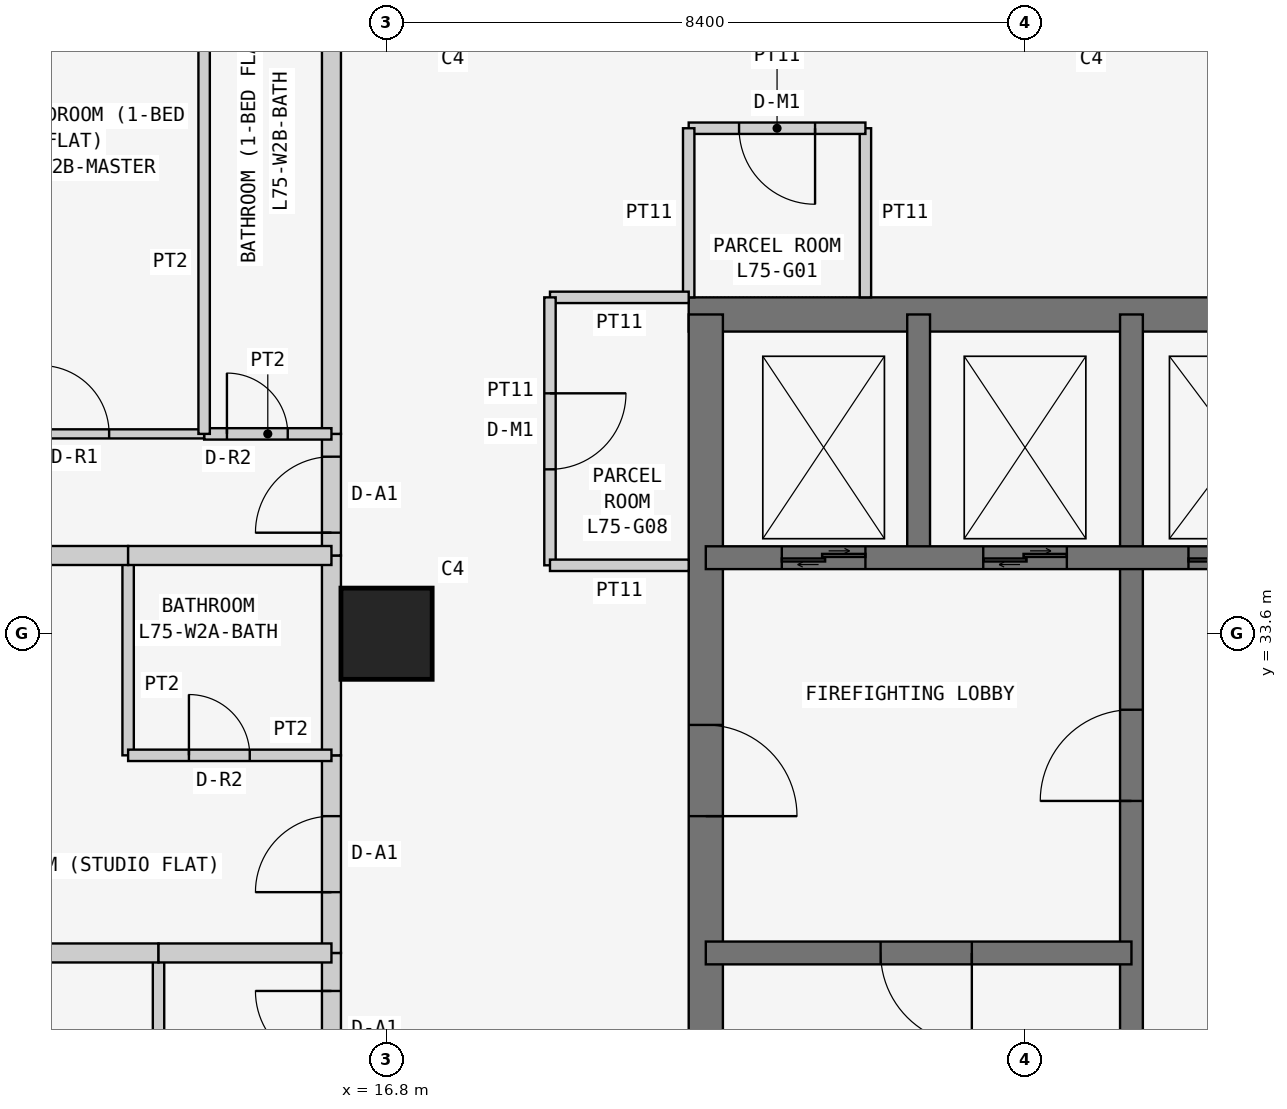
"""IFC4 building model, lengths in metres.
Left out: names, types, materials, properties, quantities, classifications, styles, units other than length and angle.
Written with IfcOpenShell. Run it as: python <this file> out.ifc"""

import sys

from ifc_helpers import new_model, si_unit, direction, frame, frame_2d, origin, origin_2d, place, context, subcontext, project, spatial, rectangle, extrude, element, fill, save


model = new_model("IFC4")
c1 = context("Model", 3, precision=1e-05, world=origin(), true_north=direction((0.0, 1.0)))
c2 = subcontext(c1, "Body", "Model", "MODEL_VIEW")
j1 = project(units=[si_unit("LENGTHUNIT", "METRE"), si_unit("PLANEANGLEUNIT", "RADIAN")], contexts=[c1])
p1 = place(None, origin())
s1 = spatial("IfcSite", under=j1, at=p1, CompositionType="ELEMENT")
p2 = place(p1, origin())
s2 = spatial("IfcBuilding", under=s1, at=p2, CompositionType="ELEMENT")
p3 = place(p2, frame((0.0, 0.0, 286.5)))
s3 = spatial("IfcBuildingStorey", under=s2, at=p3, CompositionType="ELEMENT", Elevation=286.5)
p4 = place(p3, frame((16.8, 33.6, 0.0), z_axis=(0.0, 0.0, 1.0), x_axis=(1.0, 0.0, 0.0)))
e1 = element("IfcColumn", 1, at=p4, inside=s3, PredefinedType="COLUMN", context=c2, shape_type="SweptSolid", body=[
    extrude(rectangle(XDim=1.2, YDim=1.2, at=origin_2d()), origin(), (0.0, 0.0, 1.0), 3.6),
])
p5 = place(p3, frame((37.8, 37.8, 0.0), z_axis=(0.0, 0.0, 1.0), x_axis=(-1.0, 0.0, 0.0)))
e2 = element("IfcWall", 2, at=p5, inside=s3, PredefinedType="SHEAR", context=c2, shape_type="SweptSolid", body=[
    extrude(rectangle(XDim=17.025, YDim=0.45, at=frame_2d((8.513, 0.0))), origin(), (0.0, 0.0, 1.0), 3.6),
])
p6 = place(p3, frame((21.0, 37.8, 0.0), z_axis=(0.0, 0.0, 1.0), x_axis=(0.0, -1.0, 0.0)))
e3 = element("IfcWall", 3, at=p6, inside=s3, PredefinedType="SHEAR", context=c2, shape_type="SweptSolid", body=[
    extrude(rectangle(XDim=17.025, YDim=0.45, at=frame_2d((8.513, 0.0))), origin(), (0.0, 0.0, 1.0), 3.6),
])
p7 = place(p6, frame((5.4, 0.0, 0.0)))
e4 = element("IfcOpeningElement", 4, at=p7, cuts=e3, PredefinedType="OPENING", context=c2, shape_type="SweptSolid", body=[
    extrude(rectangle(XDim=1.2, YDim=2.1, at=frame_2d((0.6, 1.05))), frame((0.0, 0.235, 0.0), z_axis=(0.0, -1.0, 0.0), x_axis=(1.0, 0.0, 0.0)), (0.0, 0.0, 1.0), 0.47),
])
p8 = place(p3, frame((26.6, 21.0, 0.0), z_axis=(0.0, 0.0, 1.0), x_axis=(0.0, 1.0, 0.0)))
e5 = element("IfcWall", 5, at=p8, inside=s3, PredefinedType="SHEAR", context=c2, shape_type="SweptSolid", body=[
    extrude(rectangle(XDim=16.8, YDim=0.3, at=frame_2d((8.4, 0.0))), origin(), (0.0, 0.0, 1.0), 3.6),
])
p9 = place(p8, frame((10.4, 0.0, 0.0)))
e6 = element("IfcOpeningElement", 6, at=p9, cuts=e5, PredefinedType="OPENING", context=c2, shape_type="SweptSolid", body=[
    extrude(rectangle(XDim=1.2, YDim=2.1, at=frame_2d((0.6, 1.05))), frame((0.0, 0.16, 0.0), z_axis=(0.0, -1.0, 0.0), x_axis=(1.0, 0.0, 0.0)), (0.0, 0.0, 1.0), 0.32),
])
p10 = place(p3, frame((21.0, 29.4, 0.0), z_axis=(0.0, 0.0, 1.0), x_axis=(1.0, 0.0, 0.0)))
e7 = element("IfcWall", 7, at=p10, inside=s3, PredefinedType="SHEAR", context=c2, shape_type="SweptSolid", body=[
    extrude(rectangle(XDim=5.6, YDim=0.3, at=frame_2d((2.8, 0.0))), origin(), (0.0, 0.0, 1.0), 3.6),
])
p11 = place(p10, frame((2.3, 0.0, 0.0)))
e8 = element("IfcOpeningElement", 8, at=p11, cuts=e7, PredefinedType="OPENING", context=c2, shape_type="SweptSolid", body=[
    extrude(rectangle(XDim=1.2, YDim=2.1, at=frame_2d((0.6, 1.05))), frame((0.0, 0.16, 0.0), z_axis=(0.0, -1.0, 0.0), x_axis=(1.0, 0.0, 0.0)), (0.0, 0.0, 1.0), 0.32),
])
p12 = place(p3, frame((21.0, 34.6, 0.0), z_axis=(0.0, 0.0, 1.0), x_axis=(1.0, 0.0, 0.0)))
e9 = element("IfcWall", 9, at=p12, inside=s3, PredefinedType="SHEAR", context=c2, shape_type="SweptSolid", body=[
    extrude(rectangle(XDim=11.2, YDim=0.3, at=frame_2d((5.6, 0.0))), origin(), (0.0, 0.0, 1.0), 3.6),
])
p13 = place(p12, frame((9.35, 0.0, 0.0)))
e10 = element("IfcOpeningElement", 10, at=p13, cuts=e9, PredefinedType="OPENING", context=c2, shape_type="SweptSolid", body=[
    extrude(rectangle(XDim=0.9, YDim=2.1, at=frame_2d((0.45, 1.05))), frame((0.0, 0.16, 0.0), z_axis=(0.0, -1.0, 0.0), x_axis=(1.0, 0.0, 0.0)), (0.0, 0.0, 1.0), 0.32),
])
p14 = place(p12, frame((1.0, 0.0, 0.0)))
e11 = element("IfcOpeningElement", 11, at=p14, cuts=e9, PredefinedType="OPENING", context=c2, shape_type="SweptSolid", body=[
    extrude(rectangle(XDim=1.1, YDim=2.1, at=frame_2d((0.55, 1.05))), frame((0.0, 0.16, 0.0), z_axis=(0.0, -1.0, 0.0), x_axis=(1.0, 0.0, 0.0)), (0.0, 0.0, 1.0), 0.32),
])
p15 = place(p12, frame((3.65, 0.0, 0.0)))
e12 = element("IfcOpeningElement", 12, at=p15, cuts=e9, PredefinedType="OPENING", context=c2, shape_type="SweptSolid", body=[
    extrude(rectangle(XDim=1.1, YDim=2.1, at=frame_2d((0.55, 1.05))), frame((0.0, 0.16, 0.0), z_axis=(0.0, -1.0, 0.0), x_axis=(1.0, 0.0, 0.0)), (0.0, 0.0, 1.0), 0.32),
])
p16 = place(p12, frame((6.35, 0.0, 0.0)))
e13 = element("IfcOpeningElement", 13, at=p16, cuts=e9, PredefinedType="OPENING", context=c2, shape_type="SweptSolid", body=[
    extrude(rectangle(XDim=1.3, YDim=2.1, at=frame_2d((0.65, 1.05))), frame((0.0, 0.16, 0.0), z_axis=(0.0, -1.0, 0.0), x_axis=(1.0, 0.0, 0.0)), (0.0, 0.0, 1.0), 0.32),
])
p17 = place(p3, frame((23.8, 34.6, 0.0), z_axis=(0.0, 0.0, 1.0), x_axis=(0.0, 1.0, 0.0)))
e14 = element("IfcWall", 14, at=p17, inside=s3, PredefinedType="SHEAR", context=c2, shape_type="SweptSolid", body=[
    extrude(rectangle(XDim=3.2, YDim=0.3, at=frame_2d((1.6, 0.0))), origin(), (0.0, 0.0, 1.0), 3.6),
])
p18 = place(p3, frame((23.1, 38.025, 0.0), z_axis=(0.0, 0.0, 1.0), x_axis=(0.0, 1.0, 0.0)))
e15 = element("IfcWall", 15, at=p18, inside=s3, PredefinedType="PARTITIONING", context=c2, shape_type="SweptSolid", body=[
    extrude(rectangle(XDim=2.225, YDim=0.15, at=frame_2d((1.113, 0.0))), origin(), (0.0, 0.0, 1.0), 3.45),
])
p19 = place(p3, frame((23.1, 40.25, 0.0), z_axis=(0.0, 0.0, 1.0), x_axis=(-1.0, 0.0, 0.0)))
e16 = element("IfcWall", 16, at=p19, inside=s3, PredefinedType="PARTITIONING", context=c2, shape_type="SweptSolid", body=[
    extrude(rectangle(XDim=2.325, YDim=0.15, at=frame_2d((1.163, 0.0))), origin(), (0.0, 0.0, 1.0), 3.45),
])
p20 = place(p19, frame((0.663, 0.0, 0.0)))
e17 = element("IfcOpeningElement", 17, at=p20, cuts=e16, PredefinedType="OPENING", context=c2, shape_type="SweptSolid", body=[
    extrude(rectangle(XDim=1.0, YDim=2.1, at=frame_2d((0.5, 1.05))), frame((0.0, 0.085, 0.0), z_axis=(0.0, -1.0, 0.0), x_axis=(1.0, 0.0, 0.0)), (0.0, 0.0, 1.0), 0.17),
])
p21 = place(p3, frame((20.775, 40.25, 0.0), z_axis=(0.0, 0.0, 1.0), x_axis=(0.0, -1.0, 0.0)))
e18 = element("IfcWall", 18, at=p21, inside=s3, PredefinedType="PARTITIONING", context=c2, shape_type="SweptSolid", body=[
    extrude(rectangle(XDim=2.225, YDim=0.15, at=frame_2d((1.113, 0.0))), origin(), (0.0, 0.0, 1.0), 3.45),
])
p22 = place(p3, frame((20.775, 38.025, 0.0), z_axis=(0.0, 0.0, 1.0), x_axis=(-1.0, 0.0, 0.0)))
e19 = element("IfcWall", 19, at=p22, inside=s3, PredefinedType="PARTITIONING", context=c2, shape_type="SweptSolid", body=[
    extrude(rectangle(XDim=1.825, YDim=0.15, at=frame_2d((0.913, 0.0))), origin(), (0.0, 0.0, 1.0), 3.45),
])
p23 = place(p3, frame((18.95, 38.025, 0.0), z_axis=(0.0, 0.0, 1.0), x_axis=(0.0, -1.0, 0.0)))
e20 = element("IfcWall", 20, at=p23, inside=s3, PredefinedType="PARTITIONING", context=c2, shape_type="SweptSolid", body=[
    extrude(rectangle(XDim=3.525, YDim=0.15, at=frame_2d((1.762, 0.0))), origin(), (0.0, 0.0, 1.0), 3.45),
])
p24 = place(p23, frame((1.262, 0.0, 0.0)))
e21 = element("IfcOpeningElement", 21, at=p24, cuts=e20, PredefinedType="OPENING", context=c2, shape_type="SweptSolid", body=[
    extrude(rectangle(XDim=1.0, YDim=2.1, at=frame_2d((0.5, 1.05))), frame((0.0, 0.085, 0.0), z_axis=(0.0, -1.0, 0.0), x_axis=(1.0, 0.0, 0.0)), (0.0, 0.0, 1.0), 0.17),
])
p25 = place(p3, frame((18.95, 34.5, 0.0), z_axis=(0.0, 0.0, 1.0), x_axis=(1.0, 0.0, 0.0)))
e22 = element("IfcWall", 22, at=p25, inside=s3, PredefinedType="PARTITIONING", context=c2, shape_type="SweptSolid", body=[
    extrude(rectangle(XDim=1.825, YDim=0.15, at=frame_2d((0.913, 0.0))), origin(), (0.0, 0.0, 1.0), 3.45),
])
p26 = place(p3, frame((16.075, 22.971, 0.0), z_axis=(0.0, 0.0, 1.0), x_axis=(0.0, 1.0, 0.0)))
e23 = element("IfcWall", 23, at=p26, inside=s3, PredefinedType="PARTITIONING", context=c2, shape_type="SweptSolid", body=[
    extrude(rectangle(XDim=6.429, YDim=0.25, at=frame_2d((3.214, 0.0))), origin(), (0.0, 0.0, 1.0), 3.45),
])
p27 = place(p26, frame((4.929, 0.0, 0.0)))
e24 = element("IfcOpeningElement", 24, at=p27, cuts=e23, PredefinedType="OPENING", context=c2, shape_type="SweptSolid", body=[
    extrude(rectangle(XDim=1.0, YDim=2.1, at=frame_2d((0.5, 1.05))), frame((0.0, 0.135, 0.0), z_axis=(0.0, -1.0, 0.0), x_axis=(1.0, 0.0, 0.0)), (0.0, 0.0, 1.0), 0.27),
])
p28 = place(p3, frame((16.075, 29.4, 0.0), z_axis=(0.0, 0.0, 1.0), x_axis=(0.0, 1.0, 0.0)))
e25 = element("IfcWall", 25, at=p28, inside=s3, PredefinedType="PARTITIONING", context=c2, shape_type="SweptSolid", body=[
    extrude(rectangle(XDim=2.6, YDim=0.25, at=frame_2d((1.3, 0.0))), origin(), (0.0, 0.0, 1.0), 3.45),
])
p29 = place(p28, frame((0.8, 0.0, 0.0)))
e26 = element("IfcOpeningElement", 26, at=p29, cuts=e25, PredefinedType="OPENING", context=c2, shape_type="SweptSolid", body=[
    extrude(rectangle(XDim=1.0, YDim=2.1, at=frame_2d((0.5, 1.05))), frame((0.0, 0.135, 0.0), z_axis=(0.0, -1.0, 0.0), x_axis=(1.0, 0.0, 0.0)), (0.0, 0.0, 1.0), 0.27),
])
p30 = place(p3, frame((16.075, 32.0, 0.0), z_axis=(0.0, 0.0, 1.0), x_axis=(0.0, 1.0, 0.0)))
e27 = element("IfcWall", 27, at=p30, inside=s3, PredefinedType="PARTITIONING", context=c2, shape_type="SweptSolid", body=[
    extrude(rectangle(XDim=2.629, YDim=0.25, at=frame_2d((1.314, 0.0))), origin(), (0.0, 0.0, 1.0), 3.45),
])
p31 = place(p3, frame((16.075, 34.629, 0.0), z_axis=(0.0, 0.0, 1.0), x_axis=(0.0, 1.0, 0.0)))
e28 = element("IfcWall", 28, at=p31, inside=s3, PredefinedType="PARTITIONING", context=c2, shape_type="SweptSolid", body=[
    extrude(rectangle(XDim=1.6, YDim=0.25, at=frame_2d((0.8, 0.0))), origin(), (0.0, 0.0, 1.0), 3.45),
])
p32 = place(p31, frame((0.3, 0.0, 0.0)))
e29 = element("IfcOpeningElement", 29, at=p32, cuts=e28, PredefinedType="OPENING", context=c2, shape_type="SweptSolid", body=[
    extrude(rectangle(XDim=1.0, YDim=2.1, at=frame_2d((0.5, 1.05))), frame((0.0, 0.135, 0.0), z_axis=(0.0, -1.0, 0.0), x_axis=(1.0, 0.0, 0.0)), (0.0, 0.0, 1.0), 0.27),
])
p33 = place(p3, frame((16.075, 36.229, 0.0), z_axis=(0.0, 0.0, 1.0), x_axis=(0.0, 1.0, 0.0)))
e30 = element("IfcWall", 30, at=p33, inside=s3, PredefinedType="PARTITIONING", context=c2, shape_type="SweptSolid", body=[
    extrude(rectangle(XDim=6.471, YDim=0.25, at=frame_2d((3.235, 0.0))), origin(), (0.0, 0.0, 1.0), 3.45),
])
p34 = place(p3, frame((13.8, 24.171, 0.0), z_axis=(0.0, 0.0, 1.0), x_axis=(0.0, 1.0, 0.0)))
e31 = element("IfcWall", 31, at=p34, inside=s3, PredefinedType="PARTITIONING", context=c2, shape_type="SweptSolid", body=[
    extrude(rectangle(XDim=5.229, YDim=0.15, at=frame_2d((2.615, 0.0))), origin(), (0.0, 0.0, 1.0), 3.45),
])
p35 = place(p3, frame((13.8, 29.4, 0.0), z_axis=(0.0, 0.0, 1.0), x_axis=(-1.0, 0.0, 0.0)))
e32 = element("IfcWall", 32, at=p35, inside=s3, PredefinedType="PARTITIONING", context=c2, shape_type="SweptSolid", body=[
    extrude(rectangle(XDim=2.0, YDim=0.25, at=frame_2d((1.0, 0.0))), origin(), (0.0, 0.0, 1.0), 3.45),
])
p36 = place(p3, frame((13.8, 29.4, 0.0), z_axis=(0.0, 0.0, 1.0), x_axis=(1.0, 0.0, 0.0)))
e33 = element("IfcWall", 33, at=p36, inside=s3, PredefinedType="PARTITIONING", context=c2, shape_type="SweptSolid", body=[
    extrude(rectangle(XDim=2.275, YDim=0.25, at=frame_2d((1.137, 0.0))), origin(), (0.0, 0.0, 1.0), 3.45),
])
p37 = place(p3, frame((13.4, 34.629, 0.0), z_axis=(0.0, 0.0, 1.0), x_axis=(0.0, -1.0, 0.0)))
e34 = element("IfcWall", 34, at=p37, inside=s3, PredefinedType="PARTITIONING", context=c2, shape_type="SweptSolid", body=[
    extrude(rectangle(XDim=2.629, YDim=0.15, at=frame_2d((1.314, 0.0))), origin(), (0.0, 0.0, 1.0), 3.45),
])
p38 = place(p3, frame((13.4, 32.0, 0.0), z_axis=(0.0, 0.0, 1.0), x_axis=(1.0, 0.0, 0.0)))
e35 = element("IfcWall", 35, at=p38, inside=s3, PredefinedType="PARTITIONING", context=c2, shape_type="SweptSolid", body=[
    extrude(rectangle(XDim=2.675, YDim=0.15, at=frame_2d((1.337, 0.0))), origin(), (0.0, 0.0, 1.0), 3.45),
])
p39 = place(p38, frame((0.8, 0.0, 0.0)))
e36 = element("IfcOpeningElement", 36, at=p39, cuts=e35, PredefinedType="OPENING", context=c2, shape_type="SweptSolid", body=[
    extrude(rectangle(XDim=0.8, YDim=2.1, at=frame_2d((0.4, 1.05))), frame((0.0, 0.085, 0.0), z_axis=(0.0, -1.0, 0.0), x_axis=(1.0, 0.0, 0.0)), (0.0, 0.0, 1.0), 0.17),
])
p40 = place(p3, frame((7.75, 34.629, 0.0), z_axis=(0.0, 0.0, 1.0), x_axis=(1.0, 0.0, 0.0)))
e37 = element("IfcWall", 37, at=p40, inside=s3, PredefinedType="PARTITIONING", context=c2, shape_type="SweptSolid", body=[
    extrude(rectangle(XDim=5.65, YDim=0.25, at=frame_2d((2.825, 0.0))), origin(), (0.0, 0.0, 1.0), 3.45),
])
p41 = place(p3, frame((13.4, 34.629, 0.0), z_axis=(0.0, 0.0, 1.0), x_axis=(1.0, 0.0, 0.0)))
e38 = element("IfcWall", 38, at=p41, inside=s3, PredefinedType="PARTITIONING", context=c2, shape_type="SweptSolid", body=[
    extrude(rectangle(XDim=2.675, YDim=0.25, at=frame_2d((1.337, 0.0))), origin(), (0.0, 0.0, 1.0), 3.45),
])
p42 = place(p3, frame((14.4, 36.229, 0.0), z_axis=(0.0, 0.0, 1.0), x_axis=(1.0, 0.0, 0.0)))
e39 = element("IfcWall", 39, at=p42, inside=s3, PredefinedType="PARTITIONING", context=c2, shape_type="SweptSolid", body=[
    extrude(rectangle(XDim=1.675, YDim=0.15, at=frame_2d((0.837, 0.0))), origin(), (0.0, 0.0, 1.0), 3.45),
])
p43 = place(p42, frame((0.3, 0.0, 0.0)))
e40 = element("IfcOpeningElement", 40, at=p43, cuts=e39, PredefinedType="OPENING", context=c2, shape_type="SweptSolid", body=[
    extrude(rectangle(XDim=0.8, YDim=2.1, at=frame_2d((0.4, 1.05))), frame((0.0, 0.085, 0.0), z_axis=(0.0, -1.0, 0.0), x_axis=(1.0, 0.0, 0.0)), (0.0, 0.0, 1.0), 0.17),
])
p44 = place(p3, frame((11.0, 36.229, 0.0), z_axis=(0.0, 0.0, 1.0), x_axis=(1.0, 0.0, 0.0)))
e41 = element("IfcWall", 41, at=p44, inside=s3, PredefinedType="PARTITIONING", context=c2, shape_type="SweptSolid", body=[
    extrude(rectangle(XDim=3.4, YDim=0.12, at=frame_2d((1.7, 0.0))), origin(), (0.0, 0.0, 1.0), 3.45),
])
p45 = place(p44, frame((1.25, 0.0, 0.0)))
e42 = element("IfcOpeningElement", 42, at=p45, cuts=e41, PredefinedType="OPENING", context=c2, shape_type="SweptSolid", body=[
    extrude(rectangle(XDim=0.9, YDim=2.1, at=frame_2d((0.45, 1.05))), frame((0.0, 0.07, 0.0), z_axis=(0.0, -1.0, 0.0), x_axis=(1.0, 0.0, 0.0)), (0.0, 0.0, 1.0), 0.14),
])
p46 = place(p3, frame((14.4, 36.229, 0.0), z_axis=(0.0, 0.0, 1.0), x_axis=(0.0, 1.0, 0.0)))
e43 = element("IfcWall", 43, at=p46, inside=s3, PredefinedType="PARTITIONING", context=c2, shape_type="SweptSolid", body=[
    extrude(rectangle(XDim=6.471, YDim=0.15, at=frame_2d((3.235, 0.0))), origin(), (0.0, 0.0, 1.0), 3.45),
])
p47 = place(p20, origin())
e44 = element("IfcDoor", 44, at=p47, inside=s3, OperationType="SINGLE_SWING_LEFT", PredefinedType="DOOR", context=c2, shape_type="SweptSolid", body=[
    extrude(rectangle(XDim=1.0, YDim=2.1, at=frame_2d((0.5, 1.05))), frame((0.0, 0.025, 0.0), z_axis=(0.0, -1.0, 0.0), x_axis=(1.0, 0.0, 0.0)), (0.0, 0.0, 1.0), 0.05),
])
fill(e17, e44)
p48 = place(p24, origin())
e45 = element("IfcDoor", 45, at=p48, inside=s3, OperationType="SINGLE_SWING_LEFT", PredefinedType="DOOR", context=c2, shape_type="SweptSolid", body=[
    extrude(rectangle(XDim=1.0, YDim=2.1, at=frame_2d((0.5, 1.05))), frame((0.0, 0.025, 0.0), z_axis=(0.0, -1.0, 0.0), x_axis=(1.0, 0.0, 0.0)), (0.0, 0.0, 1.0), 0.05),
])
fill(e21, e45)
p49 = place(p27, origin())
e46 = element("IfcDoor", 46, at=p49, inside=s3, OperationType="SINGLE_SWING_RIGHT", PredefinedType="DOOR", context=c2, shape_type="SweptSolid", body=[
    extrude(rectangle(XDim=1.0, YDim=2.1, at=frame_2d((0.5, 1.05))), frame((0.0, 0.025, 0.0), z_axis=(0.0, -1.0, 0.0), x_axis=(1.0, 0.0, 0.0)), (0.0, 0.0, 1.0), 0.05),
])
fill(e24, e46)
p50 = place(p29, origin())
e47 = element("IfcDoor", 47, at=p50, inside=s3, OperationType="SINGLE_SWING_LEFT", PredefinedType="DOOR", context=c2, shape_type="SweptSolid", body=[
    extrude(rectangle(XDim=1.0, YDim=2.1, at=frame_2d((0.5, 1.05))), frame((0.0, 0.025, 0.0), z_axis=(0.0, -1.0, 0.0), x_axis=(1.0, 0.0, 0.0)), (0.0, 0.0, 1.0), 0.05),
])
fill(e26, e47)
p51 = place(p39, origin())
e48 = element("IfcDoor", 48, at=p51, inside=s3, OperationType="SINGLE_SWING_LEFT", PredefinedType="DOOR", context=c2, shape_type="SweptSolid", body=[
    extrude(rectangle(XDim=0.8, YDim=2.1, at=frame_2d((0.4, 1.05))), frame((0.0, 0.025, 0.0), z_axis=(0.0, -1.0, 0.0), x_axis=(1.0, 0.0, 0.0)), (0.0, 0.0, 1.0), 0.05),
])
fill(e36, e48)
p52 = place(p32, origin())
e49 = element("IfcDoor", 49, at=p52, inside=s3, OperationType="SINGLE_SWING_LEFT", PredefinedType="DOOR", context=c2, shape_type="SweptSolid", body=[
    extrude(rectangle(XDim=1.0, YDim=2.1, at=frame_2d((0.5, 1.05))), frame((0.0, 0.025, 0.0), z_axis=(0.0, -1.0, 0.0), x_axis=(1.0, 0.0, 0.0)), (0.0, 0.0, 1.0), 0.05),
])
fill(e29, e49)
p53 = place(p43, origin())
e50 = element("IfcDoor", 50, at=p53, inside=s3, OperationType="SINGLE_SWING_LEFT", PredefinedType="DOOR", context=c2, shape_type="SweptSolid", body=[
    extrude(rectangle(XDim=0.8, YDim=2.1, at=frame_2d((0.4, 1.05))), frame((0.0, 0.025, 0.0), z_axis=(0.0, -1.0, 0.0), x_axis=(1.0, 0.0, 0.0)), (0.0, 0.0, 1.0), 0.05),
])
fill(e40, e50)
p54 = place(p45, origin())
e51 = element("IfcDoor", 51, at=p54, inside=s3, OperationType="SINGLE_SWING_LEFT", PredefinedType="DOOR", context=c2, shape_type="SweptSolid", body=[
    extrude(rectangle(XDim=0.9, YDim=2.1, at=frame_2d((0.45, 1.05))), frame((0.0, 0.025, 0.0), z_axis=(0.0, -1.0, 0.0), x_axis=(1.0, 0.0, 0.0)), (0.0, 0.0, 1.0), 0.05),
])
fill(e42, e51)
p55 = place(p7, origin())
e52 = element("IfcDoor", 52, at=p55, inside=s3, OperationType="SINGLE_SWING_RIGHT", PredefinedType="DOOR", context=c2, shape_type="SweptSolid", body=[
    extrude(rectangle(XDim=1.2, YDim=2.1, at=frame_2d((0.6, 1.05))), frame((0.0, 0.025, 0.0), z_axis=(0.0, -1.0, 0.0), x_axis=(1.0, 0.0, 0.0)), (0.0, 0.0, 1.0), 0.05),
])
fill(e4, e52)
p56 = place(p11, frame((1.2, 0.0, 0.0), z_axis=(0.0, 0.0, 1.0), x_axis=(-1.0, 0.0, 0.0)))
e53 = element("IfcDoor", 53, at=p56, inside=s3, OperationType="SINGLE_SWING_LEFT", PredefinedType="DOOR", context=c2, shape_type="SweptSolid", body=[
    extrude(rectangle(XDim=1.2, YDim=2.1, at=frame_2d((0.6, 1.05))), frame((0.0, 0.025, 0.0), z_axis=(0.0, -1.0, 0.0), x_axis=(1.0, 0.0, 0.0)), (0.0, 0.0, 1.0), 0.05),
])
fill(e8, e53)
p57 = place(p9, origin())
e54 = element("IfcDoor", 54, at=p57, inside=s3, OperationType="SINGLE_SWING_LEFT", PredefinedType="DOOR", context=c2, shape_type="SweptSolid", body=[
    extrude(rectangle(XDim=1.2, YDim=2.1, at=frame_2d((0.6, 1.05))), frame((0.0, 0.025, 0.0), z_axis=(0.0, -1.0, 0.0), x_axis=(1.0, 0.0, 0.0)), (0.0, 0.0, 1.0), 0.05),
])
fill(e6, e54)
p58 = place(p14, origin())
e55 = element("IfcDoor", 55, at=p58, inside=s3, OperationType="DOUBLE_DOOR_SLIDING", PredefinedType="DOOR", context=c2, shape_type="SweptSolid", body=[
    extrude(rectangle(XDim=1.1, YDim=2.1, at=frame_2d((0.55, 1.05))), frame((0.0, 0.025, 0.0), z_axis=(0.0, -1.0, 0.0), x_axis=(1.0, 0.0, 0.0)), (0.0, 0.0, 1.0), 0.05),
])
fill(e11, e55)
p59 = place(p15, origin())
e56 = element("IfcDoor", 56, at=p59, inside=s3, OperationType="DOUBLE_DOOR_SLIDING", PredefinedType="DOOR", context=c2, shape_type="SweptSolid", body=[
    extrude(rectangle(XDim=1.1, YDim=2.1, at=frame_2d((0.55, 1.05))), frame((0.0, 0.025, 0.0), z_axis=(0.0, -1.0, 0.0), x_axis=(1.0, 0.0, 0.0)), (0.0, 0.0, 1.0), 0.05),
])
fill(e12, e56)
p60 = place(p16, origin())
e57 = element("IfcDoor", 57, at=p60, inside=s3, OperationType="DOUBLE_DOOR_SLIDING", PredefinedType="DOOR", context=c2, shape_type="SweptSolid", body=[
    extrude(rectangle(XDim=1.3, YDim=2.1, at=frame_2d((0.65, 1.05))), frame((0.0, 0.025, 0.0), z_axis=(0.0, -1.0, 0.0), x_axis=(1.0, 0.0, 0.0)), (0.0, 0.0, 1.0), 0.05),
])
fill(e13, e57)
save(model, sys.argv[1])
